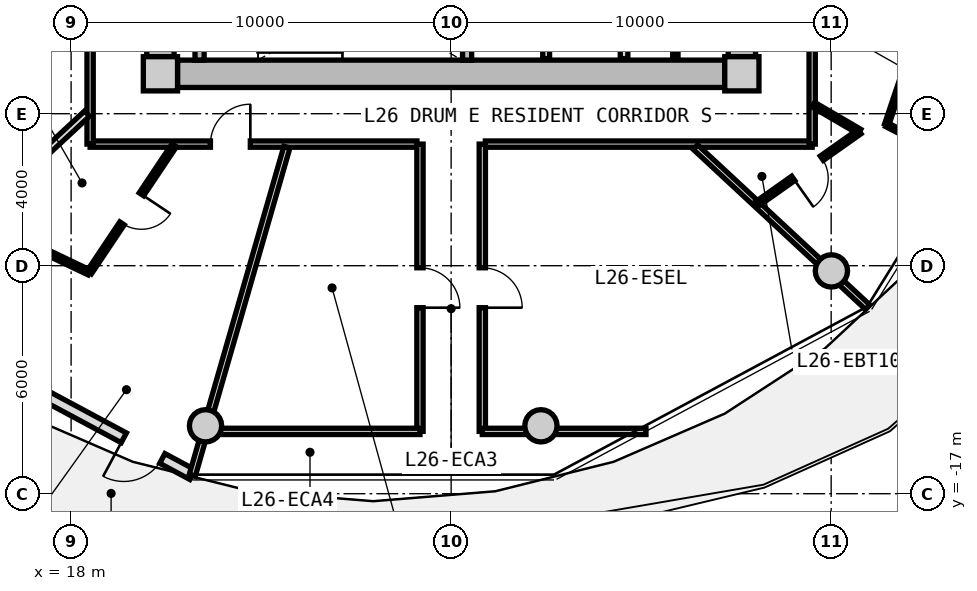
"""IFC4 building model, lengths in metres.
Left out: names, types, materials, properties, quantities, classifications, styles, units other than length and angle.
Written with IfcOpenShell. Run it as: python <this file> out.ifc"""

import sys

from ifc_helpers import new_model, si_unit, direction, frame, frame_2d, origin, origin_2d, place, context, subcontext, project, spatial, rectangle, circle, extrude, source, transform, mapped, element, fill, save


model = new_model("IFC4")
c1 = context("Model", 3, precision=1e-05, world=origin(), true_north=direction((0.0, 1.0)))
c2 = subcontext(c1, "Body", "Model", "MODEL_VIEW")
j1 = project(units=[si_unit("LENGTHUNIT", "METRE"), si_unit("PLANEANGLEUNIT", "RADIAN")], contexts=[c1])
p1 = place(None, origin())
s1 = spatial("IfcSite", under=j1, at=p1, CompositionType="ELEMENT")
p2 = place(p1, origin())
s2 = spatial("IfcBuilding", under=s1, at=p2, CompositionType="ELEMENT")
p3 = place(p2, frame((0.0, 0.0, 87.1)))
s3 = spatial("IfcBuildingStorey", under=s2, at=p3, CompositionType="ELEMENT", Elevation=87.1)
m1 = source(origin(), c2, "Body", "SweptSolid", [
    extrude(rectangle(XDim=0.9, YDim=0.9, at=origin_2d()), origin(), (0.0, 0.0, 1.0), 3.05),
])
for number, where, z_axis, x_axis in (
    (1, (20.35, -5.95, 0.0), (0.0, 0.0, 1.0), (1.0, 0.0, 0.0)),
    (2, (35.65, -5.95, 0.0), (0.0, 0.0, 1.0), (1.0, 0.0, 0.0)),
):
    element("IfcColumn", number, at=place(p3, frame(where, z_axis=z_axis, x_axis=x_axis)), inside=s3, PredefinedType="COLUMN", context=c2, shape_type="MappedRepresentation", body=[
        mapped(m1, transform((0.0, 0.0, 0.0), x_axis=(1.0, 0.0, 0.0), y_axis=(0.0, 1.0, 0.0), z_axis=(0.0, 0.0, 1.0), scale=1.0)),
    ])
m2 = source(origin(), c2, "Body", "SweptSolid", [
    extrude(rectangle(XDim=14.4, YDim=0.72, at=frame_2d((7.2, 0.0))), origin(), (0.0, 0.0, 1.0), 2.79),
])
p4 = place(p3, frame((35.2, -5.95, 0.0), z_axis=(0.0, 0.0, 1.0), x_axis=(-1.0, 0.0, 0.0)))
e3 = element("IfcWall", 3, at=p4, inside=s3, PredefinedType="SHEAR", context=c2, shape_type="MappedRepresentation", body=[
    mapped(m2, transform((0.0, 0.0, 0.0), x_axis=(1.0, 0.0, 0.0), y_axis=(0.0, 1.0, 0.0), z_axis=(0.0, 0.0, 1.0), scale=1.0)),
])
m3 = source(origin(), c2, "Body", "SweptSolid", [
    extrude(rectangle(XDim=11.0, YDim=0.72, at=frame_2d((5.5, 0.0))), origin(), (0.0, 0.0, 1.0), 2.79),
])
p5 = place(p3, frame((20.35, -5.5, 0.0), z_axis=(0.0, 0.0, 1.0), x_axis=(0.0, 1.0, 0.0)))
e4 = element("IfcWall", 4, at=p5, inside=s3, PredefinedType="SHEAR", context=c2, shape_type="MappedRepresentation", body=[
    mapped(m3, transform((0.0, 0.0, 0.0), x_axis=(1.0, 0.0, 0.0), y_axis=(0.0, 1.0, 0.0), z_axis=(0.0, 0.0, 1.0), scale=1.0)),
])
p6 = place(p5, frame((3.8, 0.0, 0.0)))
e5 = element("IfcOpeningElement", 5, at=p6, cuts=e4, PredefinedType="OPENING", context=c2, shape_type="SweptSolid", body=[
    extrude(rectangle(XDim=1.2, YDim=2.15, at=frame_2d((0.6, 1.075))), frame((0.0, 0.37, 0.0), z_axis=(0.0, -1.0, 0.0), x_axis=(1.0, 0.0, 0.0)), (0.0, 0.0, 1.0), 0.74),
])
p7 = place(p3, frame((35.65, 5.5, 0.0), z_axis=(0.0, 0.0, 1.0), x_axis=(0.0, -1.0, 0.0)))
e6 = element("IfcWall", 6, at=p7, inside=s3, PredefinedType="SHEAR", context=c2, shape_type="MappedRepresentation", body=[
    mapped(m3, transform((0.0, 0.0, 0.0), x_axis=(1.0, 0.0, 0.0), y_axis=(0.0, 1.0, 0.0), z_axis=(0.0, 0.0, 1.0), scale=1.0)),
])
p8 = place(p7, frame((5.65, 0.0, 0.0)))
e7 = element("IfcOpeningElement", 7, at=p8, cuts=e6, PredefinedType="OPENING", context=c2, shape_type="SweptSolid", body=[
    extrude(rectangle(XDim=1.2, YDim=2.15, at=frame_2d((0.6, 1.075))), frame((0.0, 0.37, 0.0), z_axis=(0.0, -1.0, 0.0), x_axis=(1.0, 0.0, 0.0)), (0.0, 0.0, 1.0), 0.74),
])
m4 = source(origin(), c2, "Body", "SweptSolid", [
    extrude(circle(Radius=0.425, at=origin_2d()), origin(), (0.0, 0.0, 1.0), 3.05),
])
for number, where, z_axis, x_axis in (
    (8, (21.537, -15.213, 0.0), (0.0, 0.0, 1.0), (1.0, 0.0, 0.0)),
    (9, (30.363, -15.213, 0.0), (0.0, 0.0, 1.0), (1.0, 0.0, 0.0)),
    (10, (38.006, -11.137, 0.0), (0.0, 0.0, 1.0), (1.0, 0.0, 0.0)),
):
    element("IfcColumn", number, at=place(p3, frame(where, z_axis=z_axis, x_axis=x_axis)), inside=s3, PredefinedType="COLUMN", context=c2, shape_type="MappedRepresentation", body=[
        mapped(m4, transform((0.0, 0.0, 0.0), x_axis=(1.0, 0.0, 0.0), y_axis=(0.0, 1.0, 0.0), z_axis=(0.0, 0.0, 1.0), scale=1.0)),
    ])
m5 = source(origin(), c2, "Body", "SweptSolid", [
    extrude(rectangle(XDim=9.351, YDim=0.29, at=frame_2d((4.675, 0.0))), origin(), (0.0, 0.0, 1.0), 2.79),
])
p9 = place(p3, frame((21.193, -16.498, 0.0), z_axis=(0.0, 0.0, 1.0), x_axis=(-0.881184411073, 0.472772708267, 0.0)))
e11 = element("IfcWall", 11, at=p9, inside=s3, PredefinedType="SOLIDWALL", context=c2, shape_type="MappedRepresentation", body=[
    mapped(m5, transform((0.0, 0.0, 0.0), x_axis=(1.0, 0.0, 0.0), y_axis=(0.0, 1.0, 0.0), z_axis=(0.0, 0.0, 1.0), scale=1.0)),
])
p10 = place(p9, frame((0.9, 0.0, 0.0)))
e12 = element("IfcOpeningElement", 12, at=p10, cuts=e11, PredefinedType="OPENING", context=c2, shape_type="SweptSolid", body=[
    extrude(rectangle(XDim=1.15, YDim=2.25, at=frame_2d((0.575, 1.125))), frame((0.0, 0.155, 0.0), z_axis=(0.0, -1.0, 0.0), x_axis=(1.0, 0.0, 0.0)), (0.0, 0.0, 1.0), 0.31),
])
p11 = place(p9, frame((5.025, 0.0, 0.85)))
e13 = element("IfcOpeningElement", 13, at=p11, cuts=e11, PredefinedType="OPENING", context=c2, shape_type="SweptSolid", body=[
    extrude(rectangle(XDim=1.2, YDim=1.5, at=frame_2d((0.6, 0.75))), frame((0.0, 0.155, 0.0), z_axis=(0.0, -1.0, 0.0), x_axis=(1.0, 0.0, 0.0)), (0.0, 0.0, 1.0), 0.31),
])
m6 = source(origin(), c2, "Body", "SweptSolid", [
    extrude(rectangle(XDim=3.14, YDim=0.24, at=frame_2d((1.57, 0.0))), origin(), (0.0, 0.0, 1.0), 2.79),
])
for number, where, z_axis, x_axis in (
    (14, (21.38, -5.59, 0.0), (0.0, 0.0, 1.0), (0.0, 1.0, 0.0)),
    (15, (28.42, -5.59, 0.0), (0.0, 0.0, 1.0), (0.0, 1.0, 0.0)),
):
    element("IfcWall", number, at=place(p3, frame(where, z_axis=z_axis, x_axis=x_axis)), inside=s3, PredefinedType="PARTITIONING", context=c2, shape_type="MappedRepresentation", body=[
        mapped(m6, transform((0.0, 0.0, 0.0), x_axis=(1.0, 0.0, 0.0), y_axis=(0.0, 1.0, 0.0), z_axis=(0.0, 0.0, 1.0), scale=1.0)),
    ])
m7 = source(origin(), c2, "Body", "SweptSolid", [
    extrude(rectangle(XDim=3.8, YDim=0.2, at=frame_2d((1.9, 0.0))), origin(), (0.0, 0.0, 1.0), 2.775),
])
p12 = place(p3, frame((32.55, -5.55, 0.0), z_axis=(0.0, 0.0, 1.0), x_axis=(0.0, 1.0, 0.0)))
e16 = element("IfcWall", 16, at=p12, inside=s3, PredefinedType="PARTITIONING", context=c2, shape_type="MappedRepresentation", body=[
    mapped(m7, transform((0.0, 0.0, 0.0), x_axis=(1.0, 0.0, 0.0), y_axis=(0.0, 1.0, 0.0), z_axis=(0.0, 0.0, 1.0), scale=1.0)),
])
m8 = source(origin(), c2, "Body", "SweptSolid", [
    extrude(rectangle(XDim=3.22, YDim=0.18, at=frame_2d((1.61, 0.0))), origin(), (0.0, 0.0, 1.0), 2.775),
])
p13 = place(p3, frame((30.5, -5.55, 0.0), z_axis=(0.0, 0.0, 1.0), x_axis=(0.0, 1.0, 0.0)))
e17 = element("IfcWall", 17, at=p13, inside=s3, PredefinedType="PARTITIONING", context=c2, shape_type="MappedRepresentation", body=[
    mapped(m8, transform((0.0, 0.0, 0.0), x_axis=(1.0, 0.0, 0.0), y_axis=(0.0, 1.0, 0.0), z_axis=(0.0, 0.0, 1.0), scale=1.0)),
])
m9 = source(origin(), c2, "Body", "SweptSolid", [
    extrude(rectangle(XDim=3.8, YDim=0.14, at=frame_2d((1.9, 0.0))), origin(), (0.0, 0.0, 1.0), 2.775),
])
p14 = place(p3, frame((33.9, -5.55, 0.0), z_axis=(0.0, 0.0, 1.0), x_axis=(0.0, 1.0, 0.0)))
e18 = element("IfcWall", 18, at=p14, inside=s3, PredefinedType="PARTITIONING", context=c2, shape_type="MappedRepresentation", body=[
    mapped(m9, transform((0.0, 0.0, 0.0), x_axis=(1.0, 0.0, 0.0), y_axis=(0.0, 1.0, 0.0), z_axis=(0.0, 0.0, 1.0), scale=1.0)),
])
m10 = source(origin(), c2, "Body", "SweptSolid", [
    extrude(rectangle(XDim=8.6, YDim=0.165, at=frame_2d((4.3, 0.0))), origin(), (0.0, 0.0, 1.0), 2.775),
])
p15 = place(p3, frame((37.5, -7.8, 0.0), z_axis=(0.0, 0.0, 1.0), x_axis=(-1.0, 0.0, 0.0)))
e19 = element("IfcWall", 19, at=p15, inside=s3, PredefinedType="PARTITIONING", context=c2, shape_type="MappedRepresentation", body=[
    mapped(m10, transform((0.0, 0.0, 0.0), x_axis=(1.0, 0.0, 0.0), y_axis=(0.0, 1.0, 0.0), z_axis=(0.0, 0.0, 1.0), scale=1.0)),
])
p16 = place(p3, frame((27.1, -7.8, 0.0), z_axis=(0.0, 0.0, 1.0), x_axis=(-1.0, 0.0, 0.0)))
e20 = element("IfcWall", 20, at=p16, inside=s3, PredefinedType="PARTITIONING", context=c2, shape_type="MappedRepresentation", body=[
    mapped(m10, transform((0.0, 0.0, 0.0), x_axis=(1.0, 0.0, 0.0), y_axis=(0.0, 1.0, 0.0), z_axis=(0.0, 0.0, 1.0), scale=1.0)),
])
p17 = place(p16, frame((4.384, 0.0, 0.0)))
e21 = element("IfcOpeningElement", 21, at=p17, cuts=e20, PredefinedType="OPENING", context=c2, shape_type="SweptSolid", body=[
    extrude(rectangle(XDim=1.05, YDim=2.15, at=frame_2d((0.525, 1.075))), frame((0.0, 0.093, 0.0), z_axis=(0.0, -1.0, 0.0), x_axis=(1.0, 0.0, 0.0)), (0.0, 0.0, 1.0), 0.185),
])
m11 = source(origin(), c2, "Body", "SweptSolid", [
    extrude(rectangle(XDim=15.6, YDim=0.165, at=frame_2d((7.8, 0.0))), origin(), (0.0, 0.0, 1.0), 2.775),
])
p18 = place(p3, frame((18.5, -7.8, 0.0), z_axis=(0.0, 0.0, 1.0), x_axis=(0.0, 1.0, 0.0)))
e22 = element("IfcWall", 22, at=p18, inside=s3, PredefinedType="PARTITIONING", context=c2, shape_type="MappedRepresentation", body=[
    mapped(m11, transform((0.0, 0.0, 0.0), x_axis=(1.0, 0.0, 0.0), y_axis=(0.0, 1.0, 0.0), z_axis=(0.0, 0.0, 1.0), scale=1.0)),
])
p19 = place(p18, frame((7.134, 0.0, 0.0)))
e23 = element("IfcOpeningElement", 23, at=p19, cuts=e22, PredefinedType="OPENING", context=c2, shape_type="SweptSolid", body=[
    extrude(rectangle(XDim=1.25, YDim=2.2, at=frame_2d((0.625, 1.1))), frame((0.0, 0.093, 0.0), z_axis=(0.0, -1.0, 0.0), x_axis=(1.0, 0.0, 0.0)), (0.0, 0.0, 1.0), 0.185),
])
p20 = place(p3, frame((37.5, 7.8, 0.0), z_axis=(0.0, 0.0, 1.0), x_axis=(0.0, -1.0, 0.0)))
e24 = element("IfcWall", 24, at=p20, inside=s3, PredefinedType="PARTITIONING", context=c2, shape_type="MappedRepresentation", body=[
    mapped(m11, transform((0.0, 0.0, 0.0), x_axis=(1.0, 0.0, 0.0), y_axis=(0.0, 1.0, 0.0), z_axis=(0.0, 0.0, 1.0), scale=1.0)),
])
p21 = place(p20, frame((9.177, 0.0, 0.0)))
e25 = element("IfcOpeningElement", 25, at=p21, cuts=e24, PredefinedType="OPENING", context=c2, shape_type="SweptSolid", body=[
    extrude(rectangle(XDim=1.05, YDim=2.15, at=frame_2d((0.525, 1.075))), frame((0.0, 0.093, 0.0), z_axis=(0.0, -1.0, 0.0), x_axis=(1.0, 0.0, 0.0)), (0.0, 0.0, 1.0), 0.185),
])
m12 = source(origin(), c2, "Body", "SweptSolid", [
    extrude(rectangle(XDim=8.989, YDim=0.165, at=frame_2d((4.495, 0.0))), origin(), (0.0, 0.0, 1.0), 2.275),
])
p22 = place(p3, frame((23.678, -7.88, 0.0), z_axis=(0.0, 0.0, 1.0), x_axis=(-0.27702323008, -0.960863221274, 0.0)))
e26 = element("IfcWall", 26, at=p22, inside=s3, PredefinedType="PARTITIONING", context=c2, shape_type="MappedRepresentation", body=[
    mapped(m12, transform((0.0, 0.0, 0.0), x_axis=(1.0, 0.0, 0.0), y_axis=(0.0, 1.0, 0.0), z_axis=(0.0, 0.0, 1.0), scale=1.0)),
])
m13 = source(origin(), c2, "Body", "SweptSolid", [
    extrude(rectangle(XDim=6.187, YDim=0.165, at=frame_2d((3.093, 0.0))), origin(), (0.0, 0.0, 1.0), 2.275),
])
p23 = place(p3, frame((34.429, -7.88, 0.0), z_axis=(0.0, 0.0, 1.0), x_axis=(0.732501077882, -0.680765870841, 0.0)))
e27 = element("IfcWall", 27, at=p23, inside=s3, PredefinedType="PARTITIONING", context=c2, shape_type="MappedRepresentation", body=[
    mapped(m13, transform((0.0, 0.0, 0.0), x_axis=(1.0, 0.0, 0.0), y_axis=(0.0, 1.0, 0.0), z_axis=(0.0, 0.0, 1.0), scale=1.0)),
])
m14 = source(origin(), c2, "Body", "SweptSolid", [
    extrude(rectangle(XDim=7.56, YDim=0.165, at=frame_2d((3.78, 0.0))), origin(), (0.0, 0.0, 1.0), 2.775),
])
p24 = place(p3, frame((27.18, -15.36, 0.0), z_axis=(0.0, 0.0, 1.0), x_axis=(0.0, 1.0, 0.0)))
e28 = element("IfcWall", 28, at=p24, inside=s3, PredefinedType="PARTITIONING", context=c2, shape_type="MappedRepresentation", body=[
    mapped(m14, transform((0.0, 0.0, 0.0), x_axis=(1.0, 0.0, 0.0), y_axis=(0.0, 1.0, 0.0), z_axis=(0.0, 0.0, 1.0), scale=1.0)),
])
p25 = place(p24, frame((3.255, 0.0, 0.0)))
e29 = element("IfcOpeningElement", 29, at=p25, cuts=e28, PredefinedType="OPENING", context=c2, shape_type="SweptSolid", body=[
    extrude(rectangle(XDim=1.05, YDim=2.15, at=frame_2d((0.525, 1.075))), frame((0.0, 0.093, 0.0), z_axis=(0.0, -1.0, 0.0), x_axis=(1.0, 0.0, 0.0)), (0.0, 0.0, 1.0), 0.185),
])
m15 = source(origin(), c2, "Body", "SweptSolid", [
    extrude(rectangle(XDim=5.814, YDim=0.165, at=frame_2d((2.907, 0.0))), origin(), (0.0, 0.0, 1.0), 2.275),
])
p26 = place(p3, frame((21.366, -15.36, 0.0), z_axis=(0.0, 0.0, 1.0), x_axis=(1.0, 0.0, 0.0)))
e30 = element("IfcWall", 30, at=p26, inside=s3, PredefinedType="PARTITIONING", context=c2, shape_type="MappedRepresentation", body=[
    mapped(m15, transform((0.0, 0.0, 0.0), x_axis=(1.0, 0.0, 0.0), y_axis=(0.0, 1.0, 0.0), z_axis=(0.0, 0.0, 1.0), scale=1.0)),
])
p27 = place(p3, frame((28.82, -15.36, 0.0), z_axis=(0.0, 0.0, 1.0), x_axis=(0.0, 1.0, 0.0)))
e31 = element("IfcWall", 31, at=p27, inside=s3, PredefinedType="PARTITIONING", context=c2, shape_type="MappedRepresentation", body=[
    mapped(m14, transform((0.0, 0.0, 0.0), x_axis=(1.0, 0.0, 0.0), y_axis=(0.0, 1.0, 0.0), z_axis=(0.0, 0.0, 1.0), scale=1.0)),
])
p28 = place(p27, frame((3.255, 0.0, 0.0)))
e32 = element("IfcOpeningElement", 32, at=p28, cuts=e31, PredefinedType="OPENING", context=c2, shape_type="SweptSolid", body=[
    extrude(rectangle(XDim=1.05, YDim=2.15, at=frame_2d((0.525, 1.075))), frame((0.0, 0.093, 0.0), z_axis=(0.0, -1.0, 0.0), x_axis=(1.0, 0.0, 0.0)), (0.0, 0.0, 1.0), 0.185),
])
m16 = source(origin(), c2, "Body", "SweptSolid", [
    extrude(rectangle(XDim=4.307, YDim=0.165, at=frame_2d((2.153, 0.0))), origin(), (0.0, 0.0, 1.0), 2.275),
])
p29 = place(p3, frame((28.82, -15.36, 0.0), z_axis=(0.0, 0.0, 1.0), x_axis=(1.0, 0.0, 0.0)))
e33 = element("IfcWall", 33, at=p29, inside=s3, PredefinedType="PARTITIONING", context=c2, shape_type="MappedRepresentation", body=[
    mapped(m16, transform((0.0, 0.0, 0.0), x_axis=(1.0, 0.0, 0.0), y_axis=(0.0, 1.0, 0.0), z_axis=(0.0, 0.0, 1.0), scale=1.0)),
])
m17 = source(origin(), c2, "Body", "SweptSolid", [
    extrude(rectangle(XDim=7.482, YDim=0.19, at=frame_2d((3.741, 0.0))), origin(), (0.0, 0.0, 1.0), 2.275),
])
p30 = place(p3, frame((18.42, -6.998, 0.0), z_axis=(0.0, 0.0, 1.0), x_axis=(-0.732508698043, -0.680757671489, 0.0)))
e34 = element("IfcWall", 34, at=p30, inside=s3, PredefinedType="PARTITIONING", context=c2, shape_type="MappedRepresentation", body=[
    mapped(m17, transform((0.0, 0.0, 0.0), x_axis=(1.0, 0.0, 0.0), y_axis=(0.0, 1.0, 0.0), z_axis=(0.0, 0.0, 1.0), scale=1.0)),
])
m18 = source(origin(), c2, "Body", "SweptSolid", [
    extrude(rectangle(XDim=4.027, YDim=0.14, at=frame_2d((2.014, 0.0))), origin(), (0.0, 0.0, 1.0), 2.775),
])
p31 = place(p3, frame((20.714, -7.83, 0.0), z_axis=(0.0, 0.0, 1.0), x_axis=(-0.555832825922, -0.831294093343, 0.0)))
e35 = element("IfcWall", 35, at=p31, inside=s3, PredefinedType="PARTITIONING", context=c2, shape_type="MappedRepresentation", body=[
    mapped(m18, transform((0.0, 0.0, 0.0), x_axis=(1.0, 0.0, 0.0), y_axis=(0.0, 1.0, 0.0), z_axis=(0.0, 0.0, 1.0), scale=1.0)),
])
p32 = place(p31, frame((1.554, 0.0, 0.0)))
e36 = element("IfcOpeningElement", 36, at=p32, cuts=e35, PredefinedType="OPENING", context=c2, shape_type="SweptSolid", body=[
    extrude(rectangle(XDim=0.92, YDim=2.1, at=frame_2d((0.46, 1.05))), frame((0.0, 0.08, 0.0), z_axis=(0.0, -1.0, 0.0), x_axis=(1.0, 0.0, 0.0)), (0.0, 0.0, 1.0), 0.16),
])
m19 = source(origin(), c2, "Body", "SweptSolid", [
    extrude(rectangle(XDim=3.291, YDim=0.14, at=frame_2d((1.646, 0.0))), origin(), (0.0, 0.0, 1.0), 2.775),
])
p33 = place(p3, frame((18.476, -11.178, 0.0), z_axis=(0.0, 0.0, 1.0), x_axis=(-0.902381393443, 0.430938302739, 0.0)))
e37 = element("IfcWall", 37, at=p33, inside=s3, PredefinedType="PARTITIONING", context=c2, shape_type="MappedRepresentation", body=[
    mapped(m19, transform((0.0, 0.0, 0.0), x_axis=(1.0, 0.0, 0.0), y_axis=(0.0, 1.0, 0.0), z_axis=(0.0, 0.0, 1.0), scale=1.0)),
])
m20 = source(origin(), c2, "Body", "SweptSolid", [
    extrude(rectangle(XDim=1.407, YDim=0.14, at=frame_2d((0.704, 0.0))), origin(), (0.0, 0.0, 1.0), 2.775),
])
p34 = place(p3, frame((37.53, -6.762, 0.0), z_axis=(0.0, 0.0, 1.0), x_axis=(0.863539718977, -0.504280828258, 0.0)))
e38 = element("IfcWall", 38, at=p34, inside=s3, PredefinedType="PARTITIONING", context=c2, shape_type="MappedRepresentation", body=[
    mapped(m20, transform((0.0, 0.0, 0.0), x_axis=(1.0, 0.0, 0.0), y_axis=(0.0, 1.0, 0.0), z_axis=(0.0, 0.0, 1.0), scale=1.0)),
])
m21 = source(origin(), c2, "Body", "SweptSolid", [
    extrude(rectangle(XDim=3.347, YDim=0.14, at=frame_2d((1.673, 0.0))), origin(), (0.0, 0.0, 1.0), 2.775),
])
p35 = place(p3, frame((38.745, -7.472, 0.0), z_axis=(0.0, 0.0, 1.0), x_axis=(-0.81705680263, -0.576557179537, 0.0)))
e39 = element("IfcWall", 39, at=p35, inside=s3, PredefinedType="PARTITIONING", context=c2, shape_type="MappedRepresentation", body=[
    mapped(m21, transform((0.0, 0.0, 0.0), x_axis=(1.0, 0.0, 0.0), y_axis=(0.0, 1.0, 0.0), z_axis=(0.0, 0.0, 1.0), scale=1.0)),
])
p36 = place(p35, frame((1.214, 0.0, 0.0)))
e40 = element("IfcOpeningElement", 40, at=p36, cuts=e39, PredefinedType="OPENING", context=c2, shape_type="SweptSolid", body=[
    extrude(rectangle(XDim=0.92, YDim=2.1, at=frame_2d((0.46, 1.05))), frame((0.0, 0.08, 0.0), z_axis=(0.0, -1.0, 0.0), x_axis=(1.0, 0.0, 0.0)), (0.0, 0.0, 1.0), 0.16),
])
m22 = source(origin(), c2, "Body", "SweptSolid", [
    extrude(rectangle(XDim=2.117, YDim=0.115, at=frame_2d((1.059, 0.0))), origin(), (0.0, 0.0, 1.0), 2.775),
])
p37 = place(p3, frame((39.46, -7.289, 0.0), z_axis=(0.0, 0.0, 1.0), x_axis=(0.888941834945, -0.45802010227, 0.0)))
e41 = element("IfcWall", 41, at=p37, inside=s3, PredefinedType="PARTITIONING", context=c2, shape_type="MappedRepresentation", body=[
    mapped(m22, transform((0.0, 0.0, 0.0), x_axis=(1.0, 0.0, 0.0), y_axis=(0.0, 1.0, 0.0), z_axis=(0.0, 0.0, 1.0), scale=1.0)),
])
m23 = source(origin(), c2, "Body", "SweptSolid", [
    extrude(rectangle(XDim=3.801, YDim=0.115, at=frame_2d((1.901, 0.0))), origin(), (0.0, 0.0, 1.0), 2.775),
])
p38 = place(p3, frame((39.46, -7.289, 0.0), z_axis=(0.0, 0.0, 1.0), x_axis=(0.320097904666, 0.947384468644, 0.0)))
e42 = element("IfcWall", 42, at=p38, inside=s3, PredefinedType="PARTITIONING", context=c2, shape_type="MappedRepresentation", body=[
    mapped(m23, transform((0.0, 0.0, 0.0), x_axis=(1.0, 0.0, 0.0), y_axis=(0.0, 1.0, 0.0), z_axis=(0.0, 0.0, 1.0), scale=1.0)),
])
p39 = place(p38, frame((1.426, 0.0, 0.0)))
e43 = element("IfcOpeningElement", 43, at=p39, cuts=e42, PredefinedType="OPENING", context=c2, shape_type="SweptSolid", body=[
    extrude(rectangle(XDim=0.95, YDim=2.1, at=frame_2d((0.475, 1.05))), frame((0.0, 0.067, 0.0), z_axis=(0.0, -1.0, 0.0), x_axis=(1.0, 0.0, 0.0)), (0.0, 0.0, 1.0), 0.135),
])
m24 = source(origin(), c2, "Body", "SweptSolid", [
    extrude(rectangle(XDim=1.15, YDim=2.25, at=frame_2d((0.575, 1.125))), frame((0.0, 0.025, 0.0), z_axis=(0.0, -1.0, 0.0), x_axis=(1.0, 0.0, 0.0)), (0.0, 0.0, 1.0), 0.05),
])
p40 = place(p10, origin())
e44 = element("IfcDoor", 44, at=p40, inside=s3, OperationType="SINGLE_SWING_RIGHT", PredefinedType="DOOR", context=c2, shape_type="MappedRepresentation", body=[
    mapped(m24, transform((0.0, 0.0, 0.0), x_axis=(1.0, 0.0, 0.0), y_axis=(0.0, 1.0, 0.0), z_axis=(0.0, 0.0, 1.0), scale=1.0)),
])
fill(e12, e44)
m25 = source(origin(), c2, "Body", "SweptSolid", [
    extrude(rectangle(XDim=1.05, YDim=2.15, at=frame_2d((0.525, 1.075))), frame((0.0, 0.025, 0.0), z_axis=(0.0, -1.0, 0.0), x_axis=(1.0, 0.0, 0.0)), (0.0, 0.0, 1.0), 0.05),
])
p41 = place(p25, frame((1.05, 0.0, 0.0), z_axis=(0.0, 0.0, 1.0), x_axis=(-1.0, 0.0, 0.0)))
e45 = element("IfcDoor", 45, at=p41, inside=s3, OperationType="SINGLE_SWING_RIGHT", PredefinedType="DOOR", context=c2, shape_type="MappedRepresentation", body=[
    mapped(m25, transform((0.0, 0.0, 0.0), x_axis=(1.0, 0.0, 0.0), y_axis=(0.0, 1.0, 0.0), z_axis=(0.0, 0.0, 1.0), scale=1.0)),
])
fill(e29, e45)
p42 = place(p28, frame((1.05, 0.0, 0.0), z_axis=(0.0, 0.0, 1.0), x_axis=(-1.0, 0.0, 0.0)))
e46 = element("IfcDoor", 46, at=p42, inside=s3, OperationType="SINGLE_SWING_RIGHT", PredefinedType="DOOR", context=c2, shape_type="MappedRepresentation", body=[
    mapped(m25, transform((0.0, 0.0, 0.0), x_axis=(1.0, 0.0, 0.0), y_axis=(0.0, 1.0, 0.0), z_axis=(0.0, 0.0, 1.0), scale=1.0)),
])
fill(e32, e46)
p43 = place(p17, frame((1.05, 0.0, 0.0), z_axis=(0.0, 0.0, 1.0), x_axis=(-1.0, 0.0, 0.0)))
e47 = element("IfcDoor", 47, at=p43, inside=s3, OperationType="SINGLE_SWING_RIGHT", PredefinedType="DOOR", context=c2, shape_type="MappedRepresentation", body=[
    mapped(m25, transform((0.0, 0.0, 0.0), x_axis=(1.0, 0.0, 0.0), y_axis=(0.0, 1.0, 0.0), z_axis=(0.0, 0.0, 1.0), scale=1.0)),
])
fill(e21, e47)
m26 = source(origin(), c2, "Body", "SweptSolid", [
    extrude(rectangle(XDim=0.92, YDim=2.1, at=frame_2d((0.46, 1.05))), frame((0.0, 0.025, 0.0), z_axis=(0.0, -1.0, 0.0), x_axis=(1.0, 0.0, 0.0)), (0.0, 0.0, 1.0), 0.05),
])
p44 = place(p32, origin())
e48 = element("IfcDoor", 48, at=p44, inside=s3, OperationType="SINGLE_SWING_LEFT", PredefinedType="DOOR", context=c2, shape_type="MappedRepresentation", body=[
    mapped(m26, transform((0.0, 0.0, 0.0), x_axis=(1.0, 0.0, 0.0), y_axis=(0.0, 1.0, 0.0), z_axis=(0.0, 0.0, 1.0), scale=1.0)),
])
fill(e36, e48)
p45 = place(p36, origin())
e49 = element("IfcDoor", 49, at=p45, inside=s3, OperationType="SINGLE_SWING_RIGHT", PredefinedType="DOOR", context=c2, shape_type="MappedRepresentation", body=[
    mapped(m26, transform((0.0, 0.0, 0.0), x_axis=(1.0, 0.0, 0.0), y_axis=(0.0, 1.0, 0.0), z_axis=(0.0, 0.0, 1.0), scale=1.0)),
])
fill(e40, e49)
save(model, sys.argv[1])
